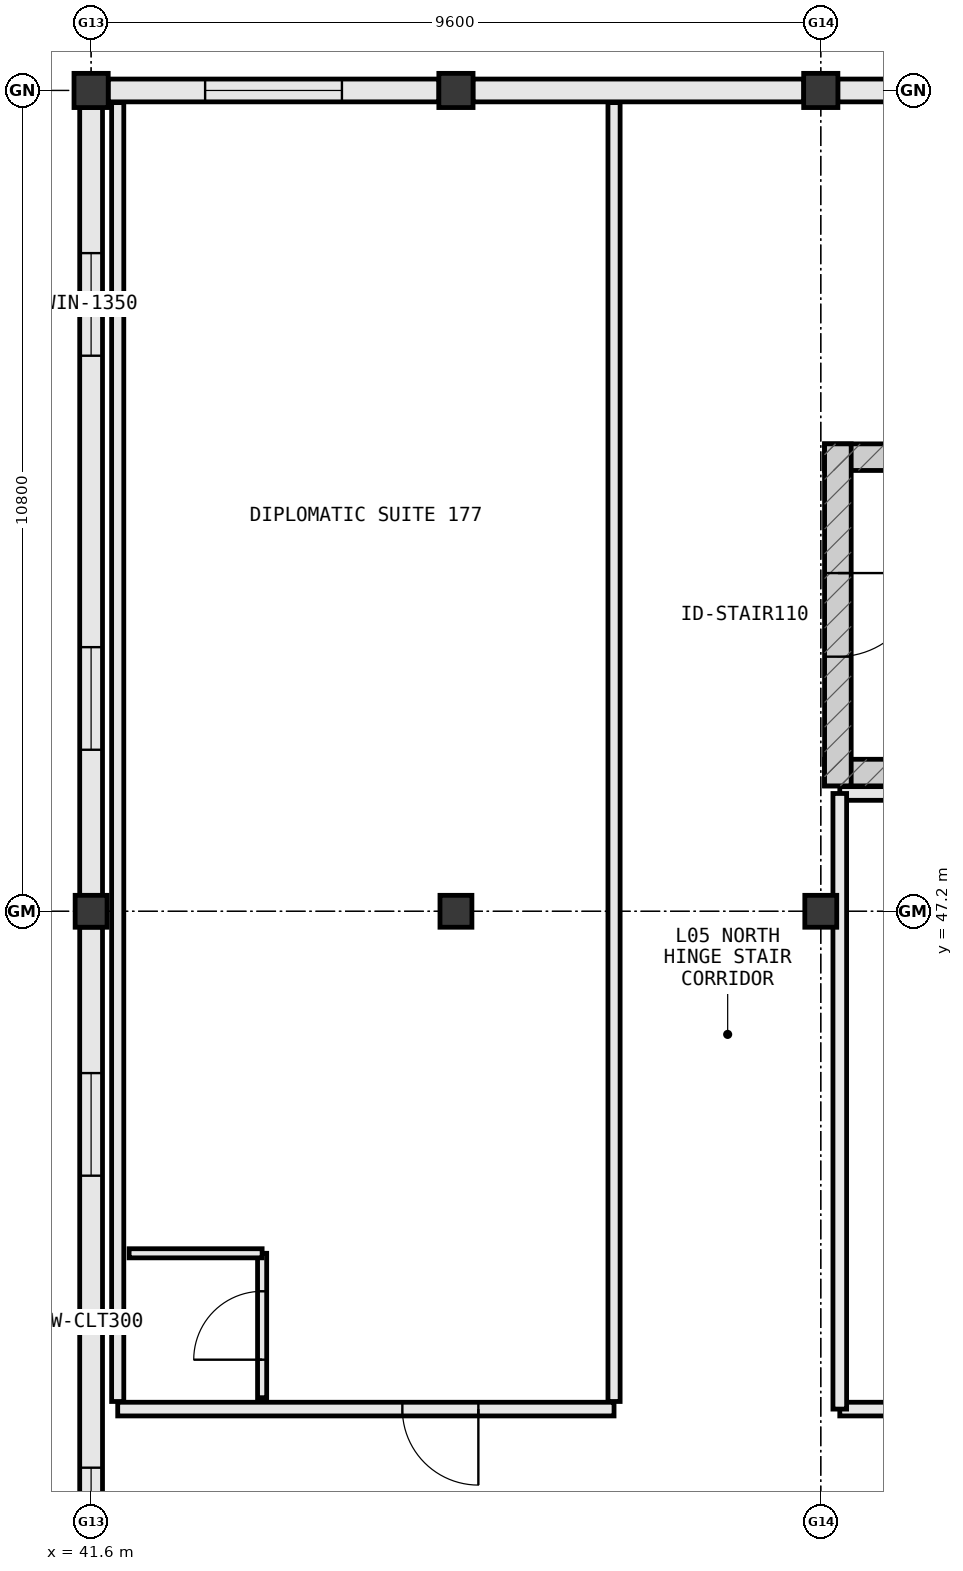
"""IFC4 building model, lengths in metres.
Left out: names, types, materials, properties, quantities, classifications, styles, units other than length and angle.
Written with IfcOpenShell. Run it as: python <this file> out.ifc"""

import sys

from ifc_helpers import new_model, si_unit, direction, frame, frame_2d, origin, origin_2d, place, context, subcontext, project, spatial, rectangle, extrude, element, fill, save


model = new_model("IFC4")
c1 = context("Model", 3, precision=1e-05, world=origin(), true_north=direction((0.0, 1.0)))
c2 = subcontext(c1, "Body", "Model", "MODEL_VIEW")
j1 = project(units=[si_unit("LENGTHUNIT", "METRE"), si_unit("PLANEANGLEUNIT", "RADIAN")], contexts=[c1])
p1 = place(None, origin())
s1 = spatial("IfcSite", under=j1, at=p1, CompositionType="ELEMENT")
p2 = place(p1, origin())
s2 = spatial("IfcBuilding", under=s1, at=p2, CompositionType="ELEMENT")
p3 = place(p2, frame((0.0, 0.0, 23.8)))
s3 = spatial("IfcBuildingStorey", under=s2, at=p3, CompositionType="ELEMENT", Elevation=23.8)
p4 = place(p3, frame((41.6, 58.0, 0.0), z_axis=(0.0, 0.0, 1.0), x_axis=(1.0, 0.0, 0.0)))
e1 = element("IfcColumn", 1, at=p4, inside=s3, PredefinedType="COLUMN", context=c2, shape_type="SweptSolid", body=[
    extrude(rectangle(XDim=0.45, YDim=0.45, at=origin_2d()), origin(), (0.0, 0.0, 1.0), 3.8),
])
for number, where, z_axis, x_axis in (
    (2, (41.6, 47.2, 0.0), (0.0, 0.0, 1.0), (1.0, 0.0, 0.0)),
    (3, (46.4, 47.2, 0.0), (0.0, 0.0, 1.0), (1.0, 0.0, 0.0)),
):
    element("IfcColumn", number, at=place(p3, frame(where, z_axis=z_axis, x_axis=x_axis)), inside=s3, PredefinedType="COLUMN", context=c2, shape_type="SweptSolid", body=[
        extrude(rectangle(XDim=0.42, YDim=0.42, at=origin_2d()), origin(), (0.0, 0.0, 1.0), 3.8),
    ])
p5 = place(p3, frame((46.4, 58.0, 0.0), z_axis=(0.0, 0.0, 1.0), x_axis=(1.0, 0.0, 0.0)))
e4 = element("IfcColumn", 4, at=p5, inside=s3, PredefinedType="COLUMN", context=c2, shape_type="SweptSolid", body=[
    extrude(rectangle(XDim=0.45, YDim=0.45, at=origin_2d()), origin(), (0.0, 0.0, 1.0), 3.8),
])
p6 = place(p3, frame((51.2, 47.2, 0.0), z_axis=(0.0, 0.0, 1.0), x_axis=(1.0, 0.0, 0.0)))
e5 = element("IfcColumn", 5, at=p6, inside=s3, PredefinedType="COLUMN", context=c2, shape_type="SweptSolid", body=[
    extrude(rectangle(XDim=0.42, YDim=0.42, at=origin_2d()), origin(), (0.0, 0.0, 1.0), 3.8),
])
p7 = place(p3, frame((51.2, 58.0, 0.0), z_axis=(0.0, 0.0, 1.0), x_axis=(1.0, 0.0, 0.0)))
e6 = element("IfcColumn", 6, at=p7, inside=s3, PredefinedType="COLUMN", context=c2, shape_type="SweptSolid", body=[
    extrude(rectangle(XDim=0.45, YDim=0.45, at=origin_2d()), origin(), (0.0, 0.0, 1.0), 3.8),
])
p8 = place(p3, frame((60.542, 58.0, 0.0), z_axis=(0.0, 0.0, 1.0), x_axis=(-1.0, 0.0, 0.0)))
e7 = element("IfcWall", 7, at=p8, inside=s3, PredefinedType="STANDARD", context=c2, shape_type="SweptSolid", body=[
    extrude(rectangle(XDim=9.119, YDim=0.3, at=frame_2d((4.56, 0.0))), origin(), (0.0, 0.0, 1.0), 2.865),
])
p9 = place(p8, frame((1.38, 0.0, 0.85)))
e8 = element("IfcOpeningElement", 8, at=p9, cuts=e7, PredefinedType="OPENING", context=c2, shape_type="SweptSolid", body=[
    extrude(rectangle(XDim=1.8, YDim=1.85, at=frame_2d((0.9, 0.925))), frame((0.0, 0.162, 0.0), z_axis=(0.0, -1.0, 0.0), x_axis=(1.0, 0.0, 0.0)), (0.0, 0.0, 1.0), 0.324),
])
p10 = place(p8, frame((5.939, 0.0, 0.85)))
e9 = element("IfcOpeningElement", 9, at=p10, cuts=e7, PredefinedType="OPENING", context=c2, shape_type="SweptSolid", body=[
    extrude(rectangle(XDim=1.8, YDim=1.85, at=frame_2d((0.9, 0.925))), frame((0.0, 0.162, 0.0), z_axis=(0.0, -1.0, 0.0), x_axis=(1.0, 0.0, 0.0)), (0.0, 0.0, 1.0), 0.324),
])
p11 = place(p3, frame((50.977, 58.0, 0.0), z_axis=(0.0, 0.0, 1.0), x_axis=(-1.0, 0.0, 0.0)))
e10 = element("IfcWall", 10, at=p11, inside=s3, PredefinedType="STANDARD", context=c2, shape_type="SweptSolid", body=[
    extrude(rectangle(XDim=4.354, YDim=0.3, at=frame_2d((2.177, 0.0))), origin(), (0.0, 0.0, 1.0), 2.865),
])
p12 = place(p3, frame((46.177, 58.0, 0.0), z_axis=(0.0, 0.0, 1.0), x_axis=(-1.0, 0.0, 0.0)))
e11 = element("IfcWall", 11, at=p12, inside=s3, PredefinedType="STANDARD", context=c2, shape_type="SweptSolid", body=[
    extrude(rectangle(XDim=4.354, YDim=0.3, at=frame_2d((2.177, 0.0))), origin(), (0.0, 0.0, 1.0), 2.865),
])
p13 = place(p12, frame((1.277, 0.0, 0.85)))
e12 = element("IfcOpeningElement", 12, at=p13, cuts=e11, PredefinedType="OPENING", context=c2, shape_type="SweptSolid", body=[
    extrude(rectangle(XDim=1.8, YDim=1.85, at=frame_2d((0.9, 0.925))), frame((0.0, 0.162, 0.0), z_axis=(0.0, -1.0, 0.0), x_axis=(1.0, 0.0, 0.0)), (0.0, 0.0, 1.0), 0.324),
])
p14 = place(p3, frame((41.6, 57.777, 0.0), z_axis=(0.0, 0.0, 1.0), x_axis=(0.0, -1.0, 0.0)))
e13 = element("IfcWall", 13, at=p14, inside=s3, PredefinedType="STANDARD", context=c2, shape_type="SweptSolid", body=[
    extrude(rectangle(XDim=10.369, YDim=0.3, at=frame_2d((5.185, 0.0))), origin(), (0.0, 0.0, 1.0), 2.905),
])
p15 = place(p14, frame((1.917, 0.0, 0.85)))
e14 = element("IfcOpeningElement", 14, at=p15, cuts=e13, PredefinedType="OPENING", context=c2, shape_type="SweptSolid", body=[
    extrude(rectangle(XDim=1.35, YDim=1.65, at=frame_2d((0.675, 0.825))), frame((0.0, 0.162, 0.0), z_axis=(0.0, -1.0, 0.0), x_axis=(1.0, 0.0, 0.0)), (0.0, 0.0, 1.0), 0.324),
])
p16 = place(p14, frame((7.102, 0.0, 0.85)))
e15 = element("IfcOpeningElement", 15, at=p16, cuts=e13, PredefinedType="OPENING", context=c2, shape_type="SweptSolid", body=[
    extrude(rectangle(XDim=1.35, YDim=1.65, at=frame_2d((0.675, 0.825))), frame((0.0, 0.162, 0.0), z_axis=(0.0, -1.0, 0.0), x_axis=(1.0, 0.0, 0.0)), (0.0, 0.0, 1.0), 0.324),
])
p17 = place(p3, frame((41.6, 46.992, 0.0), z_axis=(0.0, 0.0, 1.0), x_axis=(0.0, -1.0, 0.0)))
e16 = element("IfcWall", 16, at=p17, inside=s3, PredefinedType="STANDARD", context=c2, shape_type="SweptSolid", body=[
    extrude(rectangle(XDim=10.384, YDim=0.3, at=frame_2d((5.192, 0.0))), origin(), (0.0, 0.0, 1.0), 2.905),
])
p18 = place(p17, frame((1.921, 0.0, 0.85)))
e17 = element("IfcOpeningElement", 17, at=p18, cuts=e16, PredefinedType="OPENING", context=c2, shape_type="SweptSolid", body=[
    extrude(rectangle(XDim=1.35, YDim=1.65, at=frame_2d((0.675, 0.825))), frame((0.0, 0.162, 0.0), z_axis=(0.0, -1.0, 0.0), x_axis=(1.0, 0.0, 0.0)), (0.0, 0.0, 1.0), 0.324),
])
p19 = place(p17, frame((7.113, 0.0, 0.85)))
e18 = element("IfcOpeningElement", 18, at=p19, cuts=e16, PredefinedType="OPENING", context=c2, shape_type="SweptSolid", body=[
    extrude(rectangle(XDim=1.35, YDim=1.65, at=frame_2d((0.675, 0.825))), frame((0.0, 0.162, 0.0), z_axis=(0.0, -1.0, 0.0), x_axis=(1.0, 0.0, 0.0)), (0.0, 0.0, 1.0), 0.324),
])
for number, where, z_axis, x_axis in (
    (19, (51.25, 49.025, 0.0), (0.0, 0.0, 1.0), (1.0, 0.0, 0.0)),
    (20, (63.35, 53.175, 0.0), (0.0, 0.0, 1.0), (-1.0, 0.0, 0.0)),
):
    element("IfcWall", number, at=place(p3, frame(where, z_axis=z_axis, x_axis=x_axis)), inside=s3, PredefinedType="SHEAR", context=c2, shape_type="SweptSolid", body=[
        extrude(rectangle(XDim=12.1, YDim=0.35, at=frame_2d((6.05, 0.0))), origin(), (0.0, 0.0, 1.0), 3.8),
    ])
p20 = place(p3, frame((51.425, 53.35, 0.0), z_axis=(0.0, 0.0, 1.0), x_axis=(0.0, -1.0, 0.0)))
e21 = element("IfcWall", 21, at=p20, inside=s3, PredefinedType="SHEAR", context=c2, shape_type="SweptSolid", body=[
    extrude(rectangle(XDim=4.5, YDim=0.35, at=frame_2d((2.25, 0.0))), origin(), (0.0, 0.0, 1.0), 3.8),
])
p21 = place(p20, frame((1.7, 0.0, 0.0)))
e22 = element("IfcOpeningElement", 22, at=p21, cuts=e21, PredefinedType="OPENING", context=c2, shape_type="SweptSolid", body=[
    extrude(rectangle(XDim=1.1, YDim=2.2, at=frame_2d((0.55, 1.1))), frame((0.0, 0.187, 0.0), z_axis=(0.0, -1.0, 0.0), x_axis=(1.0, 0.0, 0.0)), (0.0, 0.0, 1.0), 0.374),
])
p22 = place(p3, frame((51.45, 40.65, 0.0), z_axis=(0.0, 0.0, 1.0), x_axis=(1.0, 0.0, 0.0)))
e23 = element("IfcWall", 23, at=p22, inside=s3, PredefinedType="PARTITIONING", context=c2, shape_type="SweptSolid", body=[
    extrude(rectangle(XDim=11.75, YDim=0.18, at=frame_2d((5.875, 0.0))), origin(), (0.0, 0.0, 1.0), 3.55),
])
p23 = place(p22, frame((5.35, 0.0, 0.0)))
e24 = element("IfcOpeningElement", 24, at=p23, cuts=e23, PredefinedType="OPENING", context=c2, shape_type="SweptSolid", body=[
    extrude(rectangle(XDim=1.05, YDim=2.2, at=frame_2d((0.525, 1.1))), frame((0.0, 0.102, 0.0), z_axis=(0.0, -1.0, 0.0), x_axis=(1.0, 0.0, 0.0)), (0.0, 0.0, 1.0), 0.204),
])
p24 = place(p3, frame((63.2, 48.75, 0.0), z_axis=(0.0, 0.0, 1.0), x_axis=(-1.0, 0.0, 0.0)))
e25 = element("IfcWall", 25, at=p24, inside=s3, PredefinedType="PARTITIONING", context=c2, shape_type="SweptSolid", body=[
    extrude(rectangle(XDim=11.75, YDim=0.18, at=frame_2d((5.875, 0.0))), origin(), (0.0, 0.0, 1.0), 3.55),
])
p25 = place(p3, frame((51.45, 48.75, 0.0), z_axis=(0.0, 0.0, 1.0), x_axis=(0.0, -1.0, 0.0)))
e26 = element("IfcWall", 26, at=p25, inside=s3, PredefinedType="PARTITIONING", context=c2, shape_type="SweptSolid", body=[
    extrude(rectangle(XDim=8.1, YDim=0.18, at=frame_2d((4.05, 0.0))), origin(), (0.0, 0.0, 1.0), 2.905),
])
p26 = place(p3, frame((41.95, 40.65, 0.0), z_axis=(0.0, 0.0, 1.0), x_axis=(1.0, 0.0, 0.0)))
e27 = element("IfcWall", 27, at=p26, inside=s3, PredefinedType="PARTITIONING", context=c2, shape_type="SweptSolid", body=[
    extrude(rectangle(XDim=6.53, YDim=0.18, at=frame_2d((3.265, 0.0))), origin(), (0.0, 0.0, 1.0), 3.55),
])
p27 = place(p26, frame((3.745, 0.0, 0.0)))
e28 = element("IfcOpeningElement", 28, at=p27, cuts=e27, PredefinedType="OPENING", context=c2, shape_type="SweptSolid", body=[
    extrude(rectangle(XDim=1.0, YDim=2.2, at=frame_2d((0.5, 1.1))), frame((0.0, 0.102, 0.0), z_axis=(0.0, -1.0, 0.0), x_axis=(1.0, 0.0, 0.0)), (0.0, 0.0, 1.0), 0.204),
])
p28 = place(p3, frame((41.95, 40.75, 0.0), z_axis=(0.0, 0.0, 1.0), x_axis=(0.0, 1.0, 0.0)))
e29 = element("IfcWall", 29, at=p28, inside=s3, PredefinedType="PARTITIONING", context=c2, shape_type="SweptSolid", body=[
    extrude(rectangle(XDim=17.09, YDim=0.16, at=frame_2d((8.545, 0.0))), origin(), (0.0, 0.0, 1.0), 2.905),
])
p29 = place(p3, frame((48.48, 40.75, 0.0), z_axis=(0.0, 0.0, 1.0), x_axis=(0.0, 1.0, 0.0)))
e30 = element("IfcWall", 30, at=p29, inside=s3, PredefinedType="PARTITIONING", context=c2, shape_type="SweptSolid", body=[
    extrude(rectangle(XDim=17.09, YDim=0.16, at=frame_2d((8.545, 0.0))), origin(), (0.0, 0.0, 1.0), 3.05),
])
p30 = place(p3, frame((43.85, 40.8, 0.0), z_axis=(0.0, 0.0, 1.0), x_axis=(0.0, 1.0, 0.0)))
e31 = element("IfcWall", 31, at=p30, inside=s3, PredefinedType="PARTITIONING", context=c2, shape_type="SweptSolid", body=[
    extrude(rectangle(XDim=1.9, YDim=0.12, at=frame_2d((0.95, 0.0))), origin(), (0.0, 0.0, 1.0), 3.05),
])
p31 = place(p30, frame((0.5, 0.0, 0.0)))
e32 = element("IfcOpeningElement", 32, at=p31, cuts=e31, PredefinedType="OPENING", context=c2, shape_type="SweptSolid", body=[
    extrude(rectangle(XDim=0.9, YDim=2.15, at=frame_2d((0.45, 1.075))), frame((0.0, 0.072, 0.0), z_axis=(0.0, -1.0, 0.0), x_axis=(1.0, 0.0, 0.0)), (0.0, 0.0, 1.0), 0.144),
])
p32 = place(p3, frame((42.1, 42.7, 0.0), z_axis=(0.0, 0.0, 1.0), x_axis=(1.0, 0.0, 0.0)))
e33 = element("IfcWall", 33, at=p32, inside=s3, PredefinedType="PARTITIONING", context=c2, shape_type="SweptSolid", body=[
    extrude(rectangle(XDim=1.75, YDim=0.12, at=frame_2d((0.875, 0.0))), origin(), (0.0, 0.0, 1.0), 3.55),
])
p33 = place(p13, origin())
e34 = element("IfcWindow", 34, at=p33, inside=s3, PartitioningType="SINGLE_PANEL", PredefinedType="WINDOW", context=c2, shape_type="SweptSolid", body=[
    extrude(rectangle(XDim=1.8, YDim=1.85, at=frame_2d((0.9, 0.925))), frame((0.0, 0.03, 0.0), z_axis=(0.0, -1.0, 0.0), x_axis=(1.0, 0.0, 0.0)), (0.0, 0.0, 1.0), 0.06),
])
fill(e12, e34)
p34 = place(p15, origin())
e35 = element("IfcWindow", 35, at=p34, inside=s3, PartitioningType="SINGLE_PANEL", PredefinedType="WINDOW", context=c2, shape_type="SweptSolid", body=[
    extrude(rectangle(XDim=1.35, YDim=1.65, at=frame_2d((0.675, 0.825))), frame((0.0, 0.03, 0.0), z_axis=(0.0, -1.0, 0.0), x_axis=(1.0, 0.0, 0.0)), (0.0, 0.0, 1.0), 0.06),
])
fill(e14, e35)
p35 = place(p16, origin())
e36 = element("IfcWindow", 36, at=p35, inside=s3, PartitioningType="SINGLE_PANEL", PredefinedType="WINDOW", context=c2, shape_type="SweptSolid", body=[
    extrude(rectangle(XDim=1.35, YDim=1.65, at=frame_2d((0.675, 0.825))), frame((0.0, 0.03, 0.0), z_axis=(0.0, -1.0, 0.0), x_axis=(1.0, 0.0, 0.0)), (0.0, 0.0, 1.0), 0.06),
])
fill(e15, e36)
p36 = place(p18, origin())
e37 = element("IfcWindow", 37, at=p36, inside=s3, PartitioningType="SINGLE_PANEL", PredefinedType="WINDOW", context=c2, shape_type="SweptSolid", body=[
    extrude(rectangle(XDim=1.35, YDim=1.65, at=frame_2d((0.675, 0.825))), frame((0.0, 0.03, 0.0), z_axis=(0.0, -1.0, 0.0), x_axis=(1.0, 0.0, 0.0)), (0.0, 0.0, 1.0), 0.06),
])
fill(e17, e37)
p37 = place(p19, origin())
e38 = element("IfcWindow", 38, at=p37, inside=s3, PartitioningType="SINGLE_PANEL", PredefinedType="WINDOW", context=c2, shape_type="SweptSolid", body=[
    extrude(rectangle(XDim=1.35, YDim=1.65, at=frame_2d((0.675, 0.825))), frame((0.0, 0.03, 0.0), z_axis=(0.0, -1.0, 0.0), x_axis=(1.0, 0.0, 0.0)), (0.0, 0.0, 1.0), 0.06),
])
fill(e18, e38)
p38 = place(p21, origin())
e39 = element("IfcDoor", 39, at=p38, inside=s3, OperationType="SINGLE_SWING_LEFT", PredefinedType="DOOR", context=c2, shape_type="SweptSolid", body=[
    extrude(rectangle(XDim=1.1, YDim=2.2, at=frame_2d((0.55, 1.1))), frame((0.0, 0.025, 0.0), z_axis=(0.0, -1.0, 0.0), x_axis=(1.0, 0.0, 0.0)), (0.0, 0.0, 1.0), 0.05),
])
fill(e22, e39)
p39 = place(p27, frame((1.0, 0.0, 0.0), z_axis=(0.0, 0.0, 1.0), x_axis=(-1.0, 0.0, 0.0)))
e40 = element("IfcDoor", 40, at=p39, inside=s3, OperationType="SINGLE_SWING_RIGHT", PredefinedType="DOOR", context=c2, shape_type="SweptSolid", body=[
    extrude(rectangle(XDim=1.0, YDim=2.2, at=frame_2d((0.5, 1.1))), frame((0.0, 0.025, 0.0), z_axis=(0.0, -1.0, 0.0), x_axis=(1.0, 0.0, 0.0)), (0.0, 0.0, 1.0), 0.05),
])
fill(e28, e40)
p40 = place(p31, origin())
e41 = element("IfcDoor", 41, at=p40, inside=s3, OperationType="SINGLE_SWING_LEFT", PredefinedType="DOOR", context=c2, shape_type="SweptSolid", body=[
    extrude(rectangle(XDim=0.9, YDim=2.15, at=frame_2d((0.45, 1.075))), frame((0.0, 0.025, 0.0), z_axis=(0.0, -1.0, 0.0), x_axis=(1.0, 0.0, 0.0)), (0.0, 0.0, 1.0), 0.05),
])
fill(e32, e41)
save(model, sys.argv[1])
